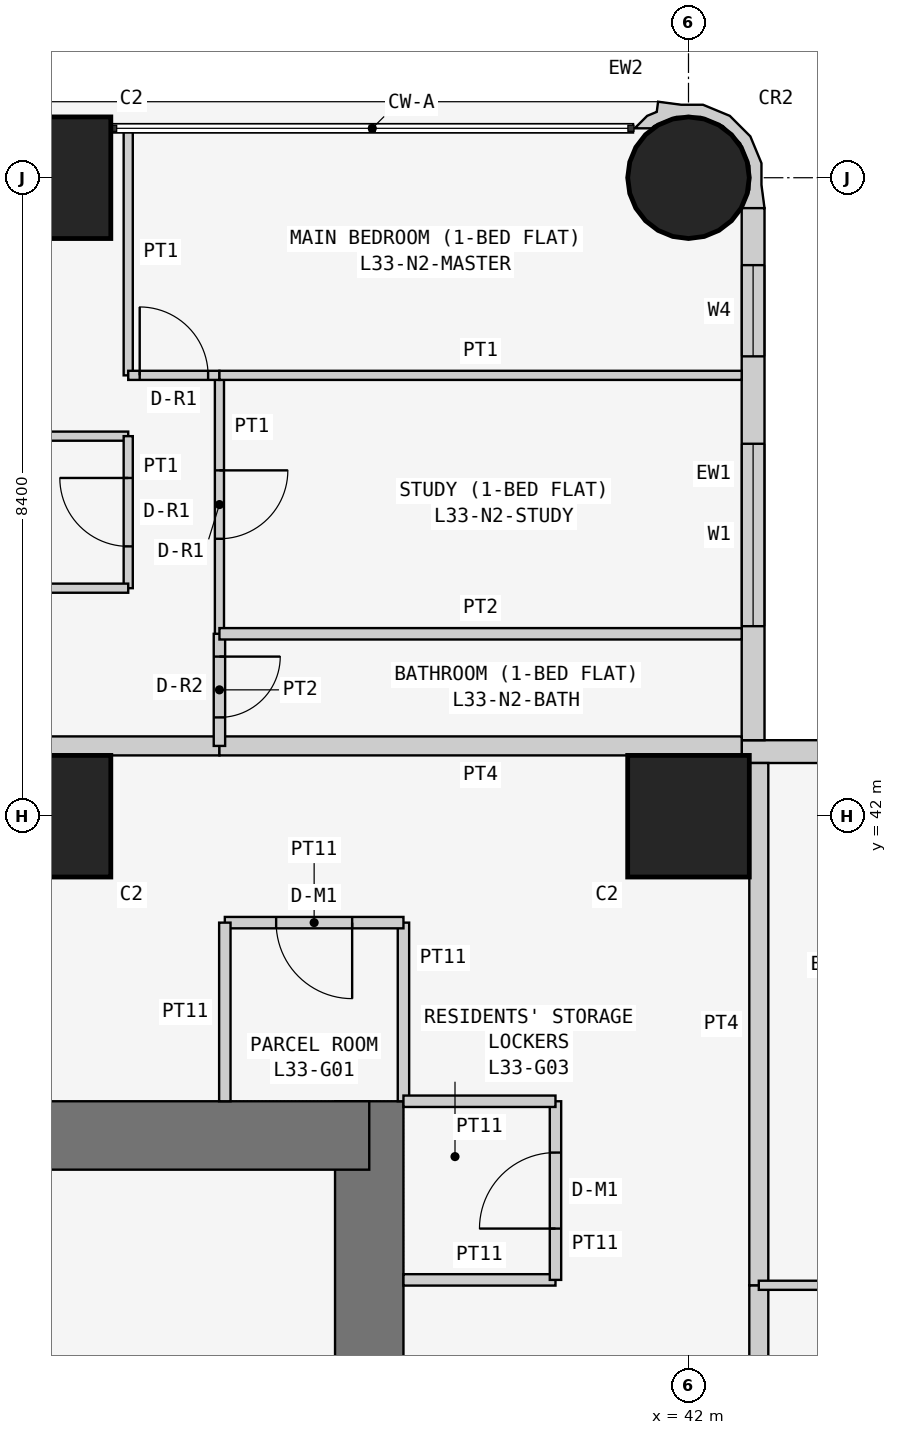
"""IFC4 building model, lengths in metres.
Left out: names, types, materials, properties, quantities, classifications, styles, units other than length and angle.
Written with IfcOpenShell. Run it as: python <this file> out.ifc"""

import sys

from ifc_helpers import new_model, si_unit, direction, frame, frame_2d, origin, origin_2d, place, context, subcontext, project, spatial, polyline, rectangle, circle, outline, extrude, element, fill, save


model = new_model("IFC4")
c1 = context("Model", 3, precision=1e-05, world=origin(), true_north=direction((0.0, 1.0)))
c2 = subcontext(c1, "Body", "Model", "MODEL_VIEW")
j1 = project(units=[si_unit("LENGTHUNIT", "METRE"), si_unit("PLANEANGLEUNIT", "RADIAN")], contexts=[c1])
p1 = place(None, origin())
s1 = spatial("IfcSite", under=j1, at=p1, CompositionType="ELEMENT")
p2 = place(p1, origin())
s2 = spatial("IfcBuilding", under=s1, at=p2, CompositionType="ELEMENT")
p3 = place(p2, frame((0.0, 0.0, 130.5)))
s3 = spatial("IfcBuildingStorey", under=s2, at=p3, CompositionType="ELEMENT", Elevation=130.5)
for number, where, z_axis, x_axis in (
    (1, (33.6, 42.0, 0.0), (0.0, 0.0, 1.0), (1.0, 0.0, 0.0)),
    (2, (33.6, 50.4, 0.0), (0.0, 0.0, 1.0), (1.0, 0.0, 0.0)),
    (3, (42.0, 42.0, 0.0), (0.0, 0.0, 1.0), (1.0, 0.0, 0.0)),
):
    element("IfcColumn", number, at=place(p3, frame(where, z_axis=z_axis, x_axis=x_axis)), inside=s3, PredefinedType="COLUMN", context=c2, shape_type="SweptSolid", body=[
        extrude(rectangle(XDim=1.6, YDim=1.6, at=origin_2d()), origin(), (0.0, 0.0, 1.0), 3.6),
    ])
p4 = place(p3, frame((42.0, 50.4, 0.0), z_axis=(0.0, 0.0, 1.0), x_axis=(1.0, 0.0, 0.0)))
e4 = element("IfcColumn", 4, at=p4, inside=s3, PredefinedType="COLUMN", context=c2, shape_type="SweptSolid", body=[
    extrude(circle(Radius=0.8, at=origin_2d()), origin(), (0.0, 0.0, 1.0), 3.6),
])
p5 = place(p3, frame((37.8, 21.0, 0.0), z_axis=(0.0, 0.0, 1.0), x_axis=(0.0, 1.0, 0.0)))
e5 = element("IfcWall", 5, at=p5, inside=s3, PredefinedType="SHEAR", context=c2, shape_type="SweptSolid", body=[
    extrude(rectangle(XDim=17.25, YDim=0.9, at=frame_2d((8.625, 0.0))), origin(), (0.0, 0.0, 1.0), 3.6),
])
p6 = place(p5, frame((5.2, 0.0, 0.0)))
e6 = element("IfcOpeningElement", 6, at=p6, cuts=e5, PredefinedType="OPENING", context=c2, shape_type="SweptSolid", body=[
    extrude(rectangle(XDim=1.2, YDim=2.1, at=frame_2d((0.6, 1.05))), frame((0.0, 0.46, 0.0), z_axis=(0.0, -1.0, 0.0), x_axis=(1.0, 0.0, 0.0)), (0.0, 0.0, 1.0), 0.92),
])
p7 = place(p3, frame((37.8, 37.8, 0.0), z_axis=(0.0, 0.0, 1.0), x_axis=(-1.0, 0.0, 0.0)))
e7 = element("IfcWall", 7, at=p7, inside=s3, PredefinedType="SHEAR", context=c2, shape_type="SweptSolid", body=[
    extrude(rectangle(XDim=17.25, YDim=0.9, at=frame_2d((8.625, 0.0))), origin(), (0.0, 0.0, 1.0), 3.6),
])
p8 = place(p3, frame((58.4, 42.85, 0.0), z_axis=(0.0, 0.0, 1.0), x_axis=(-1.0, 0.0, 0.0)))
e8 = element("IfcWall", 8, at=p8, inside=s3, PredefinedType="SOLIDWALL", context=c2, shape_type="SweptSolid", body=[
    extrude(rectangle(XDim=15.7, YDim=0.3, at=frame_2d((7.85, 0.0))), origin(), (0.0, 0.0, 1.0), 3.45),
])
p9 = place(p8, frame((12.4, 0.0, 0.9)))
e9 = element("IfcOpeningElement", 9, at=p9, cuts=e8, PredefinedType="OPENING", context=c2, shape_type="SweptSolid", body=[
    extrude(rectangle(XDim=1.8, YDim=1.5, at=frame_2d((0.9, 0.75))), frame((0.0, 0.16, 0.0), z_axis=(0.0, -1.0, 0.0), x_axis=(1.0, 0.0, 0.0)), (0.0, 0.0, 1.0), 0.32),
])
p10 = place(p8, frame((9.55, 0.0, 1.5)))
e10 = element("IfcOpeningElement", 10, at=p10, cuts=e8, PredefinedType="OPENING", context=c2, shape_type="SweptSolid", body=[
    extrude(rectangle(XDim=0.9, YDim=0.7, at=frame_2d((0.45, 0.35))), frame((0.0, 0.16, 0.0), z_axis=(0.0, -1.0, 0.0), x_axis=(1.0, 0.0, 0.0)), (0.0, 0.0, 1.0), 0.32),
])
p11 = place(p8, frame((5.1, 0.0, 0.9)))
e11 = element("IfcOpeningElement", 11, at=p11, cuts=e8, PredefinedType="OPENING", context=c2, shape_type="SweptSolid", body=[
    extrude(rectangle(XDim=1.8, YDim=1.5, at=frame_2d((0.9, 0.75))), frame((0.0, 0.16, 0.0), z_axis=(0.0, -1.0, 0.0), x_axis=(1.0, 0.0, 0.0)), (0.0, 0.0, 1.0), 0.32),
])
p12 = place(p8, frame((2.0, 0.0, 0.0)))
e12 = element("IfcOpeningElement", 12, at=p12, cuts=e8, PredefinedType="OPENING", context=c2, shape_type="SweptSolid", body=[
    extrude(rectangle(XDim=0.9, YDim=2.4, at=frame_2d((0.45, 1.2))), frame((0.0, 0.16, 0.0), z_axis=(0.0, -1.0, 0.0), x_axis=(1.0, 0.0, 0.0)), (0.0, 0.0, 1.0), 0.32),
])
p13 = place(p8, frame((0.7, 0.0, 0.9)))
e13 = element("IfcOpeningElement", 13, at=p13, cuts=e8, PredefinedType="OPENING", context=c2, shape_type="SweptSolid", body=[
    extrude(rectangle(XDim=1.2, YDim=1.5, at=frame_2d((0.6, 0.75))), frame((0.0, 0.16, 0.0), z_axis=(0.0, -1.0, 0.0), x_axis=(1.0, 0.0, 0.0)), (0.0, 0.0, 1.0), 0.32),
])
p14 = place(p3, frame((42.85, 43.0, 0.0), z_axis=(0.0, 0.0, 1.0), x_axis=(0.0, 1.0, 0.0)))
e14 = element("IfcWall", 14, at=p14, inside=s3, PredefinedType="SOLIDWALL", context=c2, shape_type="SweptSolid", body=[
    extrude(rectangle(XDim=7.0, YDim=0.3, at=frame_2d((3.5, 0.0))), origin(), (0.0, 0.0, 1.0), 3.45),
])
p15 = place(p14, frame((1.5, 0.0, 0.9)))
e15 = element("IfcOpeningElement", 15, at=p15, cuts=e14, PredefinedType="OPENING", context=c2, shape_type="SweptSolid", body=[
    extrude(rectangle(XDim=2.4, YDim=1.5, at=frame_2d((1.2, 0.75))), frame((0.0, 0.16, 0.0), z_axis=(0.0, -1.0, 0.0), x_axis=(1.0, 0.0, 0.0)), (0.0, 0.0, 1.0), 0.32),
])
p16 = place(p14, frame((5.05, 0.0, 0.9)))
e16 = element("IfcOpeningElement", 16, at=p16, cuts=e14, PredefinedType="OPENING", context=c2, shape_type="SweptSolid", body=[
    extrude(rectangle(XDim=1.2, YDim=1.5, at=frame_2d((0.6, 0.75))), frame((0.0, 0.16, 0.0), z_axis=(0.0, -1.0, 0.0), x_axis=(1.0, 0.0, 0.0)), (0.0, 0.0, 1.0), 0.32),
])
p17 = place(p3, frame((42.817, 50.073, 0.0), z_axis=(0.0, 0.0, 1.0), x_axis=(0.343276641956, 0.93923434088, 0.0)))
e17 = element("IfcWall", 17, at=p17, inside=s3, PredefinedType="SOLIDWALL", context=c2, shape_type="SweptSolid", body=[
    extrude(outline(polyline([(0.266, -0.055), (0.535, 0.044), (0.817, 0.302), (0.978, 0.648), (0.994, 1.03), (0.895, 1.3), (0.828, 1.598), (0.697, 1.569), (0.604, 1.67), (0.394, 1.767), (0.471, 1.556), (0.509, 1.539), (0.724, 1.304), (0.833, 1.005), (0.82, 0.687), (0.686, 0.397), (0.451, 0.182), (0.152, 0.073), (-0.116, 0.084), (-0.128, 0.078), (-0.146, 0.071), (-0.006, -0.197), (0.266, -0.055)])), origin(), (0.0, 0.0, 1.0), 3.45),
])
p18 = place(p3, frame((38.25, 38.25, 0.0), z_axis=(0.0, 0.0, 1.0), x_axis=(0.0, 1.0, 0.0)))
e18 = element("IfcWall", 18, at=p18, inside=s3, PredefinedType="PARTITIONING", context=c2, shape_type="SweptSolid", body=[
    extrude(rectangle(XDim=2.35, YDim=0.15, at=frame_2d((1.175, 0.0))), origin(), (0.0, 0.0, 1.0), 3.45),
])
p19 = place(p3, frame((38.25, 40.6, 0.0), z_axis=(0.0, 0.0, 1.0), x_axis=(-1.0, 0.0, 0.0)))
e19 = element("IfcWall", 19, at=p19, inside=s3, PredefinedType="PARTITIONING", context=c2, shape_type="SweptSolid", body=[
    extrude(rectangle(XDim=2.35, YDim=0.15, at=frame_2d((1.175, 0.0))), origin(), (0.0, 0.0, 1.0), 3.45),
])
p20 = place(p19, frame((0.675, 0.0, 0.0)))
e20 = element("IfcOpeningElement", 20, at=p20, cuts=e19, PredefinedType="OPENING", context=c2, shape_type="SweptSolid", body=[
    extrude(rectangle(XDim=1.0, YDim=2.1, at=frame_2d((0.5, 1.05))), frame((0.0, 0.085, 0.0), z_axis=(0.0, -1.0, 0.0), x_axis=(1.0, 0.0, 0.0)), (0.0, 0.0, 1.0), 0.17),
])
p21 = place(p3, frame((35.9, 40.6, 0.0), z_axis=(0.0, 0.0, 1.0), x_axis=(0.0, -1.0, 0.0)))
e21 = element("IfcWall", 21, at=p21, inside=s3, PredefinedType="PARTITIONING", context=c2, shape_type="SweptSolid", body=[
    extrude(rectangle(XDim=2.35, YDim=0.15, at=frame_2d((1.175, 0.0))), origin(), (0.0, 0.0, 1.0), 3.45),
])
p22 = place(p3, frame((38.25, 35.9, 0.0), z_axis=(0.0, 0.0, 1.0), x_axis=(1.0, 0.0, 0.0)))
e22 = element("IfcWall", 22, at=p22, inside=s3, PredefinedType="PARTITIONING", context=c2, shape_type="SweptSolid", body=[
    extrude(rectangle(XDim=2.0, YDim=0.15, at=frame_2d((1.0, 0.0))), origin(), (0.0, 0.0, 1.0), 3.45),
])
p23 = place(p3, frame((40.25, 35.9, 0.0), z_axis=(0.0, 0.0, 1.0), x_axis=(0.0, 1.0, 0.0)))
e23 = element("IfcWall", 23, at=p23, inside=s3, PredefinedType="PARTITIONING", context=c2, shape_type="SweptSolid", body=[
    extrude(rectangle(XDim=2.35, YDim=0.15, at=frame_2d((1.175, 0.0))), origin(), (0.0, 0.0, 1.0), 3.45),
])
p24 = place(p23, frame((0.675, 0.0, 0.0)))
e24 = element("IfcOpeningElement", 24, at=p24, cuts=e23, PredefinedType="OPENING", context=c2, shape_type="SweptSolid", body=[
    extrude(rectangle(XDim=1.0, YDim=2.1, at=frame_2d((0.5, 1.05))), frame((0.0, 0.085, 0.0), z_axis=(0.0, -1.0, 0.0), x_axis=(1.0, 0.0, 0.0)), (0.0, 0.0, 1.0), 0.17),
])
p25 = place(p3, frame((40.25, 38.25, 0.0), z_axis=(0.0, 0.0, 1.0), x_axis=(-1.0, 0.0, 0.0)))
e25 = element("IfcWall", 25, at=p25, inside=s3, PredefinedType="PARTITIONING", context=c2, shape_type="SweptSolid", body=[
    extrude(rectangle(XDim=2.0, YDim=0.15, at=frame_2d((1.0, 0.0))), origin(), (0.0, 0.0, 1.0), 3.45),
])
p26 = place(p3, frame((29.4, 42.925, 0.0), z_axis=(0.0, 0.0, 1.0), x_axis=(1.0, 0.0, 0.0)))
e26 = element("IfcWall", 26, at=p26, inside=s3, PredefinedType="PARTITIONING", context=c2, shape_type="SweptSolid", body=[
    extrude(rectangle(XDim=6.429, YDim=0.25, at=frame_2d((3.215, 0.0))), origin(), (0.0, 0.0, 1.0), 3.45),
])
p27 = place(p26, frame((0.5, 0.0, 0.0)))
e27 = element("IfcOpeningElement", 27, at=p27, cuts=e26, PredefinedType="OPENING", context=c2, shape_type="SweptSolid", body=[
    extrude(rectangle(XDim=1.0, YDim=2.1, at=frame_2d((0.5, 1.05))), frame((0.0, 0.135, 0.0), z_axis=(0.0, -1.0, 0.0), x_axis=(1.0, 0.0, 0.0)), (0.0, 0.0, 1.0), 0.27),
])
p28 = place(p3, frame((35.829, 42.925, 0.0), z_axis=(0.0, 0.0, 1.0), x_axis=(1.0, 0.0, 0.0)))
e28 = element("IfcWall", 28, at=p28, inside=s3, PredefinedType="PARTITIONING", context=c2, shape_type="SweptSolid", body=[
    extrude(rectangle(XDim=6.871, YDim=0.25, at=frame_2d((3.436, 0.0))), origin(), (0.0, 0.0, 1.0), 3.45),
])
p29 = place(p3, frame((42.925, 35.829, 0.0), z_axis=(0.0, 0.0, 1.0), x_axis=(0.0, -1.0, 0.0)))
e29 = element("IfcWall", 29, at=p29, inside=s3, PredefinedType="PARTITIONING", context=c2, shape_type="SweptSolid", body=[
    extrude(rectangle(XDim=1.2, YDim=0.25, at=frame_2d((0.6, 0.0))), origin(), (0.0, 0.0, 1.0), 3.45),
])
p30 = place(p3, frame((42.925, 42.7, 0.0), z_axis=(0.0, 0.0, 1.0), x_axis=(0.0, -1.0, 0.0)))
e30 = element("IfcWall", 30, at=p30, inside=s3, PredefinedType="PARTITIONING", context=c2, shape_type="SweptSolid", body=[
    extrude(rectangle(XDim=6.871, YDim=0.25, at=frame_2d((3.436, 0.0))), origin(), (0.0, 0.0, 1.0), 3.45),
])
p31 = place(p3, frame((29.4, 47.0, 0.0), z_axis=(0.0, 0.0, 1.0), x_axis=(1.0, 0.0, 0.0)))
e31 = element("IfcWall", 31, at=p31, inside=s3, PredefinedType="PARTITIONING", context=c2, shape_type="SweptSolid", body=[
    extrude(rectangle(XDim=5.229, YDim=0.12, at=frame_2d((2.615, 0.0))), origin(), (0.0, 0.0, 1.0), 3.45),
])
p32 = place(p3, frame((34.629, 47.0, 0.0), z_axis=(0.0, 0.0, 1.0), x_axis=(0.0, -1.0, 0.0)))
e32 = element("IfcWall", 32, at=p32, inside=s3, PredefinedType="PARTITIONING", context=c2, shape_type="SweptSolid", body=[
    extrude(rectangle(XDim=2.0, YDim=0.12, at=frame_2d((1.0, 0.0))), origin(), (0.0, 0.0, 1.0), 3.45),
])
p33 = place(p32, frame((0.55, 0.0, 0.0)))
e33 = element("IfcOpeningElement", 33, at=p33, cuts=e32, PredefinedType="OPENING", context=c2, shape_type="SweptSolid", body=[
    extrude(rectangle(XDim=0.9, YDim=2.1, at=frame_2d((0.45, 1.05))), frame((0.0, 0.07, 0.0), z_axis=(0.0, -1.0, 0.0), x_axis=(1.0, 0.0, 0.0)), (0.0, 0.0, 1.0), 0.14),
])
p34 = place(p3, frame((34.629, 45.0, 0.0), z_axis=(0.0, 0.0, 1.0), x_axis=(-1.0, 0.0, 0.0)))
e34 = element("IfcWall", 34, at=p34, inside=s3, PredefinedType="PARTITIONING", context=c2, shape_type="SweptSolid", body=[
    extrude(rectangle(XDim=5.229, YDim=0.12, at=frame_2d((2.615, 0.0))), origin(), (0.0, 0.0, 1.0), 3.45),
])
p35 = place(p3, frame((35.829, 44.4, 0.0), z_axis=(0.0, 0.0, 1.0), x_axis=(0.0, -1.0, 0.0)))
e35 = element("IfcWall", 35, at=p35, inside=s3, PredefinedType="PARTITIONING", context=c2, shape_type="SweptSolid", body=[
    extrude(rectangle(XDim=1.475, YDim=0.15, at=frame_2d((0.737, 0.0))), origin(), (0.0, 0.0, 1.0), 3.45),
])
p36 = place(p35, frame((0.3, 0.0, 0.0)))
e36 = element("IfcOpeningElement", 36, at=p36, cuts=e35, PredefinedType="OPENING", context=c2, shape_type="SweptSolid", body=[
    extrude(rectangle(XDim=0.8, YDim=2.1, at=frame_2d((0.4, 1.05))), frame((0.0, 0.085, 0.0), z_axis=(0.0, -1.0, 0.0), x_axis=(1.0, 0.0, 0.0)), (0.0, 0.0, 1.0), 0.17),
])
p37 = place(p3, frame((35.829, 47.8, 0.0), z_axis=(0.0, 0.0, 1.0), x_axis=(0.0, -1.0, 0.0)))
e37 = element("IfcWall", 37, at=p37, inside=s3, PredefinedType="PARTITIONING", context=c2, shape_type="SweptSolid", body=[
    extrude(rectangle(XDim=3.4, YDim=0.12, at=frame_2d((1.7, 0.0))), origin(), (0.0, 0.0, 1.0), 3.45),
])
p38 = place(p37, frame((1.25, 0.0, 0.0)))
e38 = element("IfcOpeningElement", 38, at=p38, cuts=e37, PredefinedType="OPENING", context=c2, shape_type="SweptSolid", body=[
    extrude(rectangle(XDim=0.9, YDim=2.1, at=frame_2d((0.45, 1.05))), frame((0.0, 0.07, 0.0), z_axis=(0.0, -1.0, 0.0), x_axis=(1.0, 0.0, 0.0)), (0.0, 0.0, 1.0), 0.14),
])
p39 = place(p3, frame((34.629, 51.05, 0.0), z_axis=(0.0, 0.0, 1.0), x_axis=(0.0, -1.0, 0.0)))
e39 = element("IfcWall", 39, at=p39, inside=s3, PredefinedType="PARTITIONING", context=c2, shape_type="SweptSolid", body=[
    extrude(rectangle(XDim=3.25, YDim=0.12, at=frame_2d((1.625, 0.0))), origin(), (0.0, 0.0, 1.0), 3.45),
])
p40 = place(p3, frame((34.629, 47.8, 0.0), z_axis=(0.0, 0.0, 1.0), x_axis=(1.0, 0.0, 0.0)))
e40 = element("IfcWall", 40, at=p40, inside=s3, PredefinedType="PARTITIONING", context=c2, shape_type="SweptSolid", body=[
    extrude(rectangle(XDim=1.2, YDim=0.12, at=frame_2d((0.6, 0.0))), origin(), (0.0, 0.0, 1.0), 3.45),
])
p41 = place(p40, frame((0.151, 0.0, 0.0)))
e41 = element("IfcOpeningElement", 41, at=p41, cuts=e40, PredefinedType="OPENING", context=c2, shape_type="SweptSolid", body=[
    extrude(rectangle(XDim=0.9, YDim=2.1, at=frame_2d((0.45, 1.05))), frame((0.0, 0.07, 0.0), z_axis=(0.0, -1.0, 0.0), x_axis=(1.0, 0.0, 0.0)), (0.0, 0.0, 1.0), 0.14),
])
p42 = place(p3, frame((35.829, 44.4, 0.0), z_axis=(0.0, 0.0, 1.0), x_axis=(1.0, 0.0, 0.0)))
e42 = element("IfcWall", 42, at=p42, inside=s3, PredefinedType="PARTITIONING", context=c2, shape_type="SweptSolid", body=[
    extrude(rectangle(XDim=6.871, YDim=0.15, at=frame_2d((3.436, 0.0))), origin(), (0.0, 0.0, 1.0), 3.45),
])
p43 = place(p3, frame((35.829, 47.8, 0.0), z_axis=(0.0, 0.0, 1.0), x_axis=(1.0, 0.0, 0.0)))
e43 = element("IfcWall", 43, at=p43, inside=s3, PredefinedType="PARTITIONING", context=c2, shape_type="SweptSolid", body=[
    extrude(rectangle(XDim=6.871, YDim=0.12, at=frame_2d((3.436, 0.0))), origin(), (0.0, 0.0, 1.0), 3.45),
])
p44 = place(p3, frame((47.6, 35.829, 0.0), z_axis=(0.0, 0.0, 1.0), x_axis=(-1.0, 0.0, 0.0)))
e44 = element("IfcWall", 44, at=p44, inside=s3, PredefinedType="PARTITIONING", context=c2, shape_type="SweptSolid", body=[
    extrude(rectangle(XDim=4.675, YDim=0.12, at=frame_2d((2.337, 0.0))), origin(), (0.0, 0.0, 1.0), 3.45),
])
p45 = place(p44, frame((1.85, 0.0, 0.0)))
e45 = element("IfcOpeningElement", 45, at=p45, cuts=e44, PredefinedType="OPENING", context=c2, shape_type="SweptSolid", body=[
    extrude(rectangle(XDim=0.9, YDim=2.1, at=frame_2d((0.45, 1.05))), frame((0.0, 0.07, 0.0), z_axis=(0.0, -1.0, 0.0), x_axis=(1.0, 0.0, 0.0)), (0.0, 0.0, 1.0), 0.14),
])
p46 = place(p15, origin())
e46 = element("IfcWindow", 46, at=p46, inside=s3, PartitioningType="SINGLE_PANEL", PredefinedType="WINDOW", context=c2, shape_type="SweptSolid", body=[
    extrude(rectangle(XDim=2.4, YDim=1.5, at=frame_2d((1.2, 0.75))), frame((0.0, 0.03, 0.0), z_axis=(0.0, -1.0, 0.0), x_axis=(1.0, 0.0, 0.0)), (0.0, 0.0, 1.0), 0.06),
])
fill(e15, e46)
p47 = place(p16, origin())
e47 = element("IfcWindow", 47, at=p47, inside=s3, PartitioningType="SINGLE_PANEL", PredefinedType="WINDOW", context=c2, shape_type="SweptSolid", body=[
    extrude(rectangle(XDim=1.2, YDim=1.5, at=frame_2d((0.6, 0.75))), frame((0.0, 0.03, 0.0), z_axis=(0.0, -1.0, 0.0), x_axis=(1.0, 0.0, 0.0)), (0.0, 0.0, 1.0), 0.06),
])
fill(e16, e47)
p48 = place(p20, origin())
e48 = element("IfcDoor", 48, at=p48, inside=s3, OperationType="SINGLE_SWING_LEFT", PredefinedType="DOOR", context=c2, shape_type="SweptSolid", body=[
    extrude(rectangle(XDim=1.0, YDim=2.1, at=frame_2d((0.5, 1.05))), frame((0.0, 0.025, 0.0), z_axis=(0.0, -1.0, 0.0), x_axis=(1.0, 0.0, 0.0)), (0.0, 0.0, 1.0), 0.05),
])
fill(e20, e48)
p49 = place(p24, origin())
e49 = element("IfcDoor", 49, at=p49, inside=s3, OperationType="SINGLE_SWING_LEFT", PredefinedType="DOOR", context=c2, shape_type="SweptSolid", body=[
    extrude(rectangle(XDim=1.0, YDim=2.1, at=frame_2d((0.5, 1.05))), frame((0.0, 0.025, 0.0), z_axis=(0.0, -1.0, 0.0), x_axis=(1.0, 0.0, 0.0)), (0.0, 0.0, 1.0), 0.05),
])
fill(e24, e49)
p50 = place(p33, frame((0.9, 0.0, 0.0), z_axis=(0.0, 0.0, 1.0), x_axis=(-1.0, 0.0, 0.0)))
e50 = element("IfcDoor", 50, at=p50, inside=s3, OperationType="SINGLE_SWING_RIGHT", PredefinedType="DOOR", context=c2, shape_type="SweptSolid", body=[
    extrude(rectangle(XDim=0.9, YDim=2.1, at=frame_2d((0.45, 1.05))), frame((0.0, 0.025, 0.0), z_axis=(0.0, -1.0, 0.0), x_axis=(1.0, 0.0, 0.0)), (0.0, 0.0, 1.0), 0.05),
])
fill(e33, e50)
p51 = place(p36, origin())
e51 = element("IfcDoor", 51, at=p51, inside=s3, OperationType="SINGLE_SWING_LEFT", PredefinedType="DOOR", context=c2, shape_type="SweptSolid", body=[
    extrude(rectangle(XDim=0.8, YDim=2.1, at=frame_2d((0.4, 1.05))), frame((0.0, 0.025, 0.0), z_axis=(0.0, -1.0, 0.0), x_axis=(1.0, 0.0, 0.0)), (0.0, 0.0, 1.0), 0.05),
])
fill(e36, e51)
p52 = place(p38, origin())
e52 = element("IfcDoor", 52, at=p52, inside=s3, OperationType="SINGLE_SWING_LEFT", PredefinedType="DOOR", context=c2, shape_type="SweptSolid", body=[
    extrude(rectangle(XDim=0.9, YDim=2.1, at=frame_2d((0.45, 1.05))), frame((0.0, 0.025, 0.0), z_axis=(0.0, -1.0, 0.0), x_axis=(1.0, 0.0, 0.0)), (0.0, 0.0, 1.0), 0.05),
])
fill(e38, e52)
p53 = place(p41, origin())
e53 = element("IfcDoor", 53, at=p53, inside=s3, OperationType="SINGLE_SWING_LEFT", PredefinedType="DOOR", context=c2, shape_type="SweptSolid", body=[
    extrude(rectangle(XDim=0.9, YDim=2.1, at=frame_2d((0.45, 1.05))), frame((0.0, 0.025, 0.0), z_axis=(0.0, -1.0, 0.0), x_axis=(1.0, 0.0, 0.0)), (0.0, 0.0, 1.0), 0.05),
])
fill(e41, e53)
save(model, sys.argv[1])
